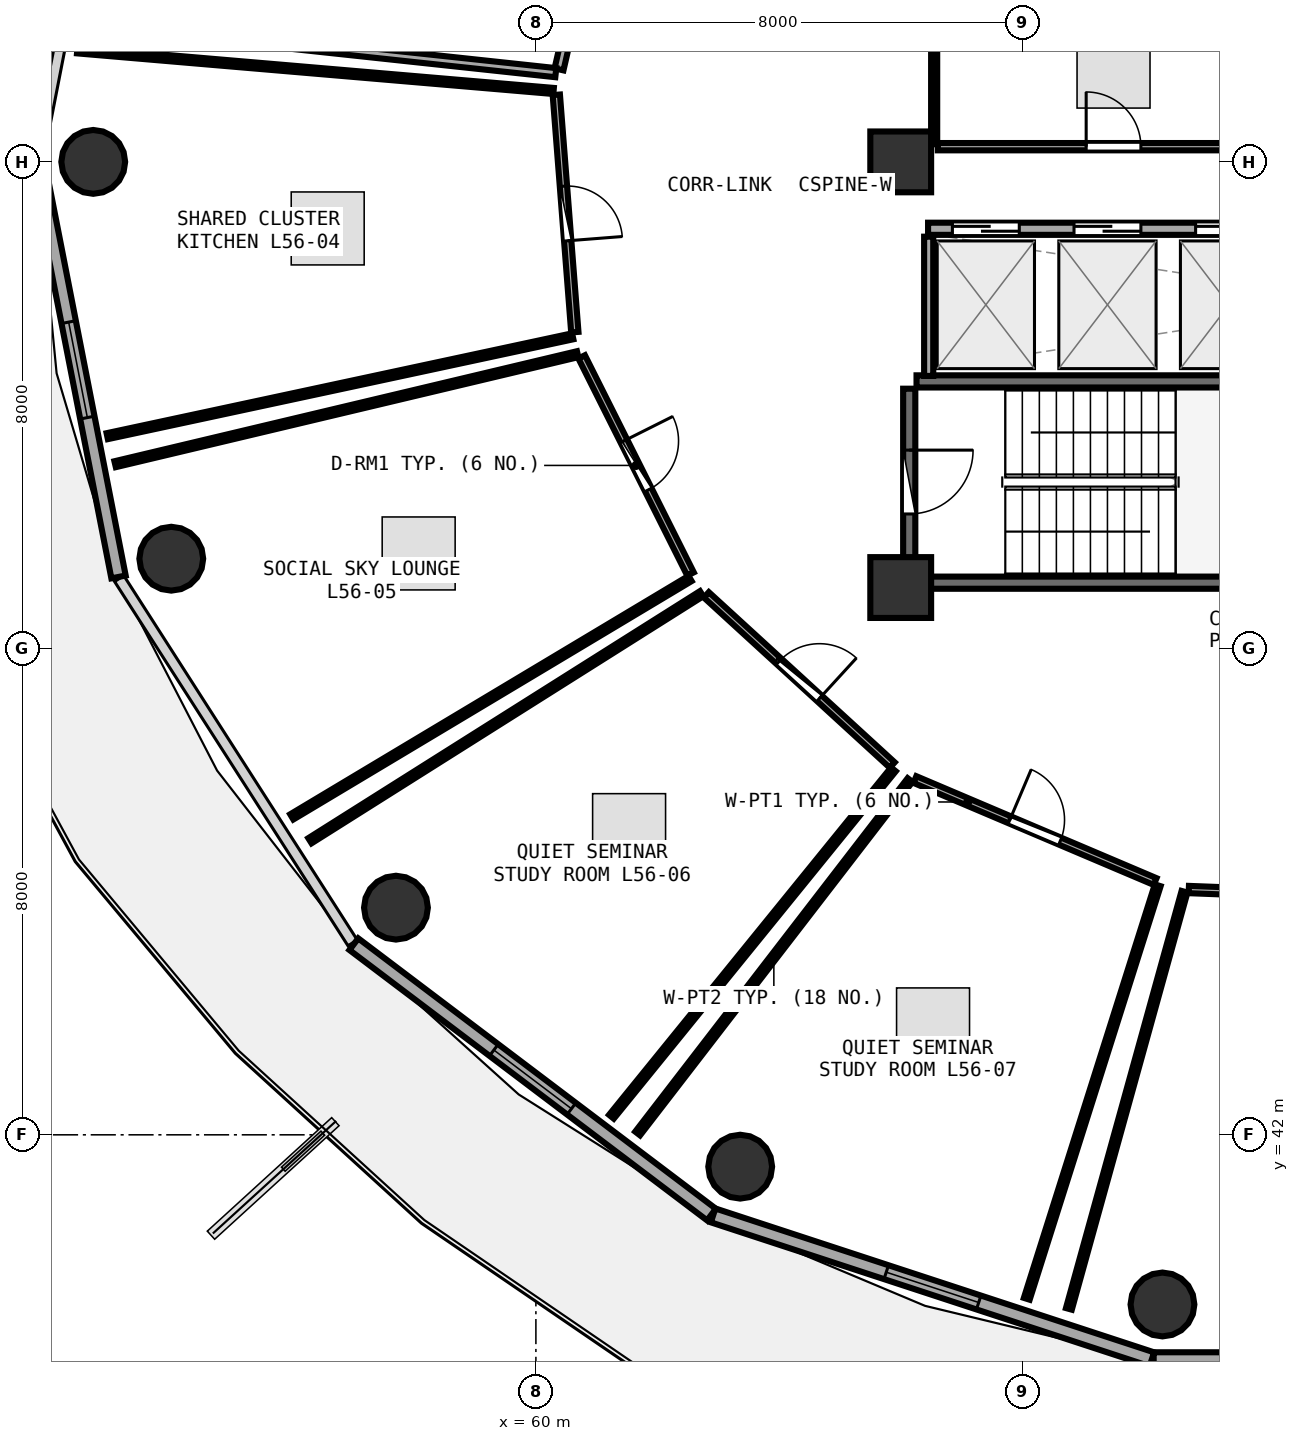
"""IFC4 building model, lengths in metres.
Left out: names, types, materials, properties, quantities, classifications, styles, units other than length and angle.
Written with IfcOpenShell. Run it as: python <this file> out.ifc"""

import sys

from ifc_helpers import new_model, si_unit, direction, frame, frame_2d, origin, origin_2d, place, context, subcontext, project, spatial, rectangle, circle, extrude, element, fill, save


model = new_model("IFC4")
c1 = context("Model", 3, precision=1e-05, world=origin(), true_north=direction((0.0, 1.0)))
c2 = subcontext(c1, "Body", "Model", "MODEL_VIEW")
j1 = project(units=[si_unit("LENGTHUNIT", "METRE"), si_unit("PLANEANGLEUNIT", "RADIAN")], contexts=[c1])
p1 = place(None, origin())
s1 = spatial("IfcSite", under=j1, at=p1, CompositionType="ELEMENT")
p2 = place(p1, origin())
s2 = spatial("IfcBuilding", under=s1, at=p2, CompositionType="ELEMENT")
p3 = place(p2, frame((0.0, 0.0, 219.45)))
s3 = spatial("IfcBuildingStorey", under=s2, at=p3, CompositionType="ELEMENT", Elevation=219.45)
for number, where, z_axis, x_axis in (
    (1, (66.0, 51.0, 0.0), (0.0, 0.0, 1.0), (1.0, 0.0, 0.0)),
    (2, (66.0, 58.0, 0.0), (0.0, 0.0, 1.0), (1.0, 0.0, 0.0)),
):
    element("IfcColumn", number, at=place(p3, frame(where, z_axis=z_axis, x_axis=x_axis)), inside=s3, PredefinedType="PILASTER", context=c2, shape_type="SweptSolid", body=[
        extrude(rectangle(XDim=1.0, YDim=1.0, at=origin_2d()), origin(), (0.0, 0.0, 1.0), 3.75),
    ])
for number, where, z_axis, x_axis in (
    (3, (52.72, 58.0, 0.0), (0.0, 0.0, 1.0), (1.0, 0.0, 0.0)),
    (4, (54.003, 51.474, 0.0), (0.0, 0.0, 1.0), (1.0, 0.0, 0.0)),
    (5, (57.698, 45.736, 0.0), (0.0, 0.0, 1.0), (1.0, 0.0, 0.0)),
    (6, (63.36, 41.476, 0.0), (0.0, 0.0, 1.0), (1.0, 0.0, 0.0)),
    (7, (70.305, 39.21, 0.0), (0.0, 0.0, 1.0), (1.0, 0.0, 0.0)),
):
    element("IfcColumn", number, at=place(p3, frame(where, z_axis=z_axis, x_axis=x_axis)), inside=s3, PredefinedType="COLUMN", context=c2, shape_type="SweptSolid", body=[
        extrude(circle(Radius=0.525, at=origin_2d()), origin(), (0.0, 0.0, 1.0), 3.75),
    ])
p4 = place(p3, frame((51.803, 57.985, 0.0), z_axis=(0.0, 0.0, 1.0), x_axis=(0.192069055673, -0.981381413036, 0.0)))
e8 = element("IfcWall", 8, at=p4, inside=s3, PredefinedType="SOLIDWALL", context=c2, shape_type="SweptSolid", body=[
    extrude(rectangle(XDim=6.94, YDim=0.24, at=frame_2d((3.47, 0.0))), origin(), (0.0, 0.0, 1.0), 3.475),
])
p5 = place(p4, frame((2.67, 0.0, 0.85)))
e9 = element("IfcOpeningElement", 9, at=p5, cuts=e8, PredefinedType="OPENING", context=c2, shape_type="SweptSolid", body=[
    extrude(rectangle(XDim=1.6, YDim=1.45, at=frame_2d((0.8, 0.725))), frame((0.0, 0.13, 0.0), z_axis=(0.0, -1.0, 0.0), x_axis=(1.0, 0.0, 0.0)), (0.0, 0.0, 1.0), 0.26),
])
p6 = place(p3, frame((57.006, 45.135, 0.0), z_axis=(0.0, 0.0, 1.0), x_axis=(0.797701674595, -0.603052268338, 0.0)))
e10 = element("IfcWall", 10, at=p6, inside=s3, PredefinedType="SOLIDWALL", context=c2, shape_type="SweptSolid", body=[
    extrude(rectangle(XDim=7.374, YDim=0.24, at=frame_2d((3.687, 0.0))), origin(), (0.0, 0.0, 1.0), 3.475),
])
p7 = place(p6, frame((2.887, 0.0, 0.85)))
e11 = element("IfcOpeningElement", 11, at=p7, cuts=e10, PredefinedType="OPENING", context=c2, shape_type="SweptSolid", body=[
    extrude(rectangle(XDim=1.6, YDim=1.45, at=frame_2d((0.8, 0.725))), frame((0.0, 0.13, 0.0), z_axis=(0.0, -1.0, 0.0), x_axis=(1.0, 0.0, 0.0)), (0.0, 0.0, 1.0), 0.26),
])
p8 = place(p3, frame((62.914, 40.675, 0.0), z_axis=(0.0, 0.0, 1.0), x_axis=(0.95022142767, -0.31157541366, 0.0)))
e12 = element("IfcWall", 12, at=p8, inside=s3, PredefinedType="SOLIDWALL", context=c2, shape_type="SweptSolid", body=[
    extrude(rectangle(XDim=7.594, YDim=0.24, at=frame_2d((3.797, 0.0))), origin(), (0.0, 0.0, 1.0), 3.475),
])
p9 = place(p8, frame((2.997, 0.0, 0.85)))
e13 = element("IfcOpeningElement", 13, at=p9, cuts=e12, PredefinedType="OPENING", context=c2, shape_type="SweptSolid", body=[
    extrude(rectangle(XDim=1.6, YDim=1.45, at=frame_2d((0.8, 0.725))), frame((0.0, 0.13, 0.0), z_axis=(0.0, -1.0, 0.0), x_axis=(1.0, 0.0, 0.0)), (0.0, 0.0, 1.0), 0.26),
])
p10 = place(p3, frame((70.16, 38.304, 0.0), z_axis=(0.0, 0.0, 1.0), x_axis=(1.0, 0.0, 0.0)))
e14 = element("IfcWall", 14, at=p10, inside=s3, PredefinedType="SOLIDWALL", context=c2, shape_type="SweptSolid", body=[
    extrude(rectangle(XDim=7.68, YDim=0.24, at=frame_2d((3.84, 0.0))), origin(), (0.0, 0.0, 1.0), 3.475),
])
p11 = place(p10, frame((3.04, 0.0, 0.85)))
e15 = element("IfcOpeningElement", 15, at=p11, cuts=e14, PredefinedType="OPENING", context=c2, shape_type="SweptSolid", body=[
    extrude(rectangle(XDim=1.6, YDim=1.45, at=frame_2d((0.8, 0.725))), frame((0.0, 0.13, 0.0), z_axis=(0.0, -1.0, 0.0), x_axis=(1.0, 0.0, 0.0)), (0.0, 0.0, 1.0), 0.26),
])
for number, where, z_axis, x_axis in (
    (16, (66.26, 51.08, 0.0), (0.0, 0.0, 1.0), (1.0, 0.0, 0.0)),
    (17, (73.42, 54.39, 0.0), (0.0, 0.0, 1.0), (-1.0, 0.0, 0.0)),
):
    element("IfcWall", number, at=place(p3, frame(where, z_axis=z_axis, x_axis=x_axis)), inside=s3, PredefinedType="SHEAR", context=c2, shape_type="SweptSolid", body=[
        extrude(rectangle(XDim=7.16, YDim=0.2, at=frame_2d((3.58, 0.0))), origin(), (0.0, 0.0, 1.0), 3.49),
    ])
p12 = place(p3, frame((66.14, 54.27, 0.0), z_axis=(0.0, 0.0, 1.0), x_axis=(0.0, -1.0, 0.0)))
e18 = element("IfcWall", 18, at=p12, inside=s3, PredefinedType="SHEAR", context=c2, shape_type="SweptSolid", body=[
    extrude(rectangle(XDim=3.07, YDim=0.2, at=frame_2d((1.535, 0.0))), origin(), (0.0, 0.0, 1.0), 3.49),
])
p13 = place(p12, frame((1.01, 0.0, 0.0)))
e19 = element("IfcOpeningElement", 19, at=p13, cuts=e18, PredefinedType="OPENING", context=c2, shape_type="SweptSolid", body=[
    extrude(rectangle(XDim=1.05, YDim=2.1, at=frame_2d((0.525, 1.05))), frame((0.0, 0.11, 0.0), z_axis=(0.0, -1.0, 0.0), x_axis=(1.0, 0.0, 0.0)), (0.0, 0.0, 1.0), 0.22),
])
p14 = place(p3, frame((66.45, 56.9, 0.0), z_axis=(0.0, 0.0, 1.0), x_axis=(1.0, 0.0, 0.0)))
e20 = element("IfcWall", 20, at=p14, inside=s3, PredefinedType="SOLIDWALL", context=c2, shape_type="SweptSolid", body=[
    extrude(rectangle(XDim=14.4, YDim=0.2, at=frame_2d((7.2, 0.0))), origin(), (0.0, 0.0, 1.0), 3.48),
])
p15 = place(p14, frame((0.4, 0.0, 0.0)))
e21 = element("IfcOpeningElement", 21, at=p15, cuts=e20, PredefinedType="OPENING", context=c2, shape_type="SweptSolid", body=[
    extrude(rectangle(XDim=1.1, YDim=2.1, at=frame_2d((0.55, 1.05))), frame((0.0, 0.11, 0.0), z_axis=(0.0, -1.0, 0.0), x_axis=(1.0, 0.0, 0.0)), (0.0, 0.0, 1.0), 0.22),
])
p16 = place(p14, frame((2.4, 0.0, 0.0)))
e22 = element("IfcOpeningElement", 22, at=p16, cuts=e20, PredefinedType="OPENING", context=c2, shape_type="SweptSolid", body=[
    extrude(rectangle(XDim=1.1, YDim=2.1, at=frame_2d((0.55, 1.05))), frame((0.0, 0.11, 0.0), z_axis=(0.0, -1.0, 0.0), x_axis=(1.0, 0.0, 0.0)), (0.0, 0.0, 1.0), 0.22),
])
p17 = place(p14, frame((4.4, 0.0, 0.0)))
e23 = element("IfcOpeningElement", 23, at=p17, cuts=e20, PredefinedType="OPENING", context=c2, shape_type="SweptSolid", body=[
    extrude(rectangle(XDim=1.1, YDim=2.1, at=frame_2d((0.55, 1.05))), frame((0.0, 0.11, 0.0), z_axis=(0.0, -1.0, 0.0), x_axis=(1.0, 0.0, 0.0)), (0.0, 0.0, 1.0), 0.22),
])
p18 = place(p3, frame((66.46, 54.48, 0.0), z_axis=(0.0, 0.0, 1.0), x_axis=(0.0, 1.0, 0.0)))
e24 = element("IfcWall", 24, at=p18, inside=s3, PredefinedType="PARTITIONING", context=c2, shape_type="SweptSolid", body=[
    extrude(rectangle(XDim=2.29, YDim=0.15, at=frame_2d((1.145, 0.0))), origin(), (0.0, 0.0, 1.0), 3.48),
])
p19 = place(p3, frame((66.61, 58.25, 0.0), z_axis=(0.0, 0.0, 1.0), x_axis=(1.0, 0.0, 0.0)))
e25 = element("IfcWall", 25, at=p19, inside=s3, PredefinedType="PARTITIONING", context=c2, shape_type="SweptSolid", body=[
    extrude(rectangle(XDim=5.78, YDim=0.12, at=frame_2d((2.89, 0.0))), origin(), (0.0, 0.0, 1.0), 3.48),
])
p20 = place(p19, frame((2.44, 0.0, 0.0)))
e26 = element("IfcOpeningElement", 26, at=p20, cuts=e25, PredefinedType="OPENING", context=c2, shape_type="SweptSolid", body=[
    extrude(rectangle(XDim=0.9, YDim=2.08, at=frame_2d((0.45, 1.04))), frame((0.0, 0.07, 0.0), z_axis=(0.0, -1.0, 0.0), x_axis=(1.0, 0.0, 0.0)), (0.0, 0.0, 1.0), 0.14),
])
p21 = place(p3, frame((70.738, 46.034, 0.0), z_axis=(0.0, 0.0, 1.0), x_axis=(0.99928078405, -0.037919844777, 0.0)))
e27 = element("IfcWall", 27, at=p21, inside=s3, PredefinedType="PARTITIONING", context=c2, shape_type="SweptSolid", body=[
    extrude(rectangle(XDim=5.389, YDim=0.12, at=frame_2d((2.694, 0.0))), origin(), (0.0, 0.0, 1.0), 3.025),
])
p22 = place(p21, frame((2.244, 0.0, 0.0)))
e28 = element("IfcOpeningElement", 28, at=p22, cuts=e27, PredefinedType="OPENING", context=c2, shape_type="SweptSolid", body=[
    extrude(rectangle(XDim=0.9, YDim=2.08, at=frame_2d((0.45, 1.04))), frame((0.0, 0.07, 0.0), z_axis=(0.0, -1.0, 0.0), x_axis=(1.0, 0.0, 0.0)), (0.0, 0.0, 1.0), 0.14),
])
p23 = place(p3, frame((60.823, 61.446, 0.0), z_axis=(0.0, 0.0, 1.0), x_axis=(-0.223956243079, -0.97459920028, 0.0)))
e29 = element("IfcWall", 29, at=p23, inside=s3, PredefinedType="PARTITIONING", context=c2, shape_type="SweptSolid", body=[
    extrude(rectangle(XDim=1.974, YDim=0.15, at=frame_2d((0.987, 0.0))), origin(), (0.0, 0.0, 1.0), 3.48),
])
p24 = place(p23, frame((0.512, 0.0, 0.0)))
e30 = element("IfcOpeningElement", 30, at=p24, cuts=e29, PredefinedType="OPENING", context=c2, shape_type="SweptSolid", body=[
    extrude(rectangle(XDim=0.95, YDim=2.08, at=frame_2d((0.475, 1.04))), frame((0.0, 0.085, 0.0), z_axis=(0.0, -1.0, 0.0), x_axis=(1.0, 0.0, 0.0)), (0.0, 0.0, 1.0), 0.17),
])
p25 = place(p3, frame((60.336, 59.103, 0.0), z_axis=(0.0, 0.0, 1.0), x_axis=(0.07781697677, -0.996967661525, 0.0)))
e31 = element("IfcWall", 31, at=p25, inside=s3, PredefinedType="PARTITIONING", context=c2, shape_type="SweptSolid", body=[
    extrude(rectangle(XDim=3.916, YDim=0.12, at=frame_2d((1.958, 0.0))), origin(), (0.0, 0.0, 1.0), 3.025),
])
p26 = place(p25, frame((1.508, 0.0, 0.0)))
e32 = element("IfcOpeningElement", 32, at=p26, cuts=e31, PredefinedType="OPENING", context=c2, shape_type="SweptSolid", body=[
    extrude(rectangle(XDim=0.9, YDim=2.08, at=frame_2d((0.45, 1.04))), frame((0.0, 0.07, 0.0), z_axis=(0.0, -1.0, 0.0), x_axis=(1.0, 0.0, 0.0)), (0.0, 0.0, 1.0), 0.14),
])
p27 = place(p3, frame((60.753, 54.793, 0.0), z_axis=(0.0, 0.0, 1.0), x_axis=(0.448191244457, -0.893937698272, 0.0)))
e33 = element("IfcWall", 33, at=p27, inside=s3, PredefinedType="PARTITIONING", context=c2, shape_type="SweptSolid", body=[
    extrude(rectangle(XDim=3.994, YDim=0.12, at=frame_2d((1.997, 0.0))), origin(), (0.0, 0.0, 1.0), 3.025),
])
p28 = place(p27, frame((1.547, 0.0, 0.0)))
e34 = element("IfcOpeningElement", 34, at=p28, cuts=e33, PredefinedType="OPENING", context=c2, shape_type="SweptSolid", body=[
    extrude(rectangle(XDim=0.9, YDim=2.08, at=frame_2d((0.45, 1.04))), frame((0.0, 0.07, 0.0), z_axis=(0.0, -1.0, 0.0), x_axis=(1.0, 0.0, 0.0)), (0.0, 0.0, 1.0), 0.14),
])
p29 = place(p3, frame((62.803, 50.879, 0.0), z_axis=(0.0, 0.0, 1.0), x_axis=(0.737723633035, -0.675102837545, 0.0)))
e35 = element("IfcWall", 35, at=p29, inside=s3, PredefinedType="PARTITIONING", context=c2, shape_type="SweptSolid", body=[
    extrude(rectangle(XDim=4.144, YDim=0.12, at=frame_2d((2.072, 0.0))), origin(), (0.0, 0.0, 1.0), 3.025),
])
p30 = place(p29, frame((1.622, 0.0, 0.0)))
e36 = element("IfcOpeningElement", 36, at=p30, cuts=e35, PredefinedType="OPENING", context=c2, shape_type="SweptSolid", body=[
    extrude(rectangle(XDim=0.9, YDim=2.08, at=frame_2d((0.45, 1.04))), frame((0.0, 0.07, 0.0), z_axis=(0.0, -1.0, 0.0), x_axis=(1.0, 0.0, 0.0)), (0.0, 0.0, 1.0), 0.14),
])
p31 = place(p3, frame((66.233, 47.843, 0.0), z_axis=(0.0, 0.0, 1.0), x_axis=(0.920481353999, -0.390786485105, 0.0)))
e37 = element("IfcWall", 37, at=p31, inside=s3, PredefinedType="PARTITIONING", context=c2, shape_type="SweptSolid", body=[
    extrude(rectangle(XDim=4.292, YDim=0.12, at=frame_2d((2.146, 0.0))), origin(), (0.0, 0.0, 1.0), 3.235),
])
p32 = place(p31, frame((1.696, 0.0, 0.0)))
e38 = element("IfcOpeningElement", 38, at=p32, cuts=e37, PredefinedType="OPENING", context=c2, shape_type="SweptSolid", body=[
    extrude(rectangle(XDim=0.9, YDim=2.08, at=frame_2d((0.45, 1.04))), frame((0.0, 0.07, 0.0), z_axis=(0.0, -1.0, 0.0), x_axis=(1.0, 0.0, 0.0)), (0.0, 0.0, 1.0), 0.14),
])
p33 = place(p3, frame((66.55, 60.68, 0.0), z_axis=(0.0, 0.0, 1.0), x_axis=(0.0, -1.0, 0.0)))
e39 = element("IfcWall", 39, at=p33, inside=s3, PredefinedType="PARTITIONING", context=c2, shape_type="SweptSolid", body=[
    extrude(rectangle(XDim=2.39, YDim=0.1, at=frame_2d((1.195, 0.0))), origin(), (0.0, 0.0, 1.0), 3.48),
])
p34 = place(p3, frame((68.766, 39.137, 0.0), z_axis=(0.0, 0.0, 1.0), x_axis=(0.267125564166, 0.96366173161, 0.0)))
e40 = element("IfcWall", 40, at=p34, inside=s3, PredefinedType="PARTITIONING", context=c2, shape_type="SweptSolid", body=[
    extrude(rectangle(XDim=7.119, YDim=0.1, at=frame_2d((3.56, 0.0))), origin(), (0.0, 0.0, 1.0), 3.075),
])
p35 = place(p3, frame((60.327, 59.467, 0.0), z_axis=(0.0, 0.0, 1.0), x_axis=(-0.994280915129, 0.10679635673, 0.0)))
e41 = element("IfcWall", 41, at=p35, inside=s3, PredefinedType="PARTITIONING", context=c2, shape_type="SweptSolid", body=[
    extrude(rectangle(XDim=7.859, YDim=0.15, at=frame_2d((3.93, 0.0))), origin(), (0.0, 0.0, 1.0), 3.075),
])
p36 = place(p3, frame((60.606, 55.132, 0.0), z_axis=(0.0, 0.0, 1.0), x_axis=(-0.977761328162, -0.209720731335, 0.0)))
e42 = element("IfcWall", 42, at=p36, inside=s3, PredefinedType="PARTITIONING", context=c2, shape_type="SweptSolid", body=[
    extrude(rectangle(XDim=7.83, YDim=0.1, at=frame_2d((3.915, 0.0))), origin(), (0.0, 0.0, 1.0), 3.075),
])
p37 = place(p3, frame((52.457, 59.835, 0.0), z_axis=(0.0, 0.0, 1.0), x_axis=(0.996382192496, -0.084985448623, 0.0)))
e43 = element("IfcWall", 43, at=p37, inside=s3, PredefinedType="PARTITIONING", context=c2, shape_type="SweptSolid", body=[
    extrude(rectangle(XDim=7.863, YDim=0.1, at=frame_2d((3.931, 0.0))), origin(), (0.0, 0.0, 1.0), 3.075),
])
p38 = place(p3, frame((62.536, 51.148, 0.0), z_axis=(0.0, 0.0, 1.0), x_axis=(-0.858084969996, -0.513507725615, 0.0)))
e44 = element("IfcWall", 44, at=p38, inside=s3, PredefinedType="PARTITIONING", context=c2, shape_type="SweptSolid", body=[
    extrude(rectangle(XDim=7.634, YDim=0.1, at=frame_2d((3.817, 0.0))), origin(), (0.0, 0.0, 1.0), 3.025),
])
p39 = place(p3, frame((53.08, 53.028, 0.0), z_axis=(0.0, 0.0, 1.0), x_axis=(0.972861128156, 0.231389769272, 0.0)))
e45 = element("IfcWall", 45, at=p39, inside=s3, PredefinedType="PARTITIONING", context=c2, shape_type="SweptSolid", body=[
    extrude(rectangle(XDim=7.819, YDim=0.1, at=frame_2d((3.91, 0.0))), origin(), (0.0, 0.0, 1.0), 3.075),
])
p40 = place(p3, frame((65.88, 48.01, 0.0), z_axis=(0.0, 0.0, 1.0), x_axis=(-0.630262810813, -0.776381857919, 0.0)))
e46 = element("IfcWall", 46, at=p40, inside=s3, PredefinedType="PARTITIONING", context=c2, shape_type="SweptSolid", body=[
    extrude(rectangle(XDim=7.358, YDim=0.1, at=frame_2d((3.679, 0.0))), origin(), (0.0, 0.0, 1.0), 3.025),
])
p41 = place(p3, frame((56.284, 46.836, 0.0), z_axis=(0.0, 0.0, 1.0), x_axis=(0.84583000996, 0.533452522959, 0.0)))
e47 = element("IfcWall", 47, at=p41, inside=s3, PredefinedType="PARTITIONING", context=c2, shape_type="SweptSolid", body=[
    extrude(rectangle(XDim=7.615, YDim=0.1, at=frame_2d((3.808, 0.0))), origin(), (0.0, 0.0, 1.0), 3.075),
])
p42 = place(p3, frame((70.227, 46.104, 0.0), z_axis=(0.0, 0.0, 1.0), x_axis=(-0.30191088513, -0.953336151334, 0.0)))
e48 = element("IfcWall", 48, at=p42, inside=s3, PredefinedType="PARTITIONING", context=c2, shape_type="SweptSolid", body=[
    extrude(rectangle(XDim=7.134, YDim=0.1, at=frame_2d((3.567, 0.0))), origin(), (0.0, 0.0, 1.0), 3.075),
])
p43 = place(p3, frame((61.673, 42.022, 0.0), z_axis=(0.0, 0.0, 1.0), x_axis=(0.610486992252, 0.792026282576, 0.0)))
e49 = element("IfcWall", 49, at=p43, inside=s3, PredefinedType="PARTITIONING", context=c2, shape_type="SweptSolid", body=[
    extrude(rectangle(XDim=7.339, YDim=0.1, at=frame_2d((3.669, 0.0))), origin(), (0.0, 0.0, 1.0), 3.025),
])
p44 = place(p5, origin())
e50 = element("IfcWindow", 50, at=p44, inside=s3, PartitioningType="SINGLE_PANEL", PredefinedType="WINDOW", context=c2, shape_type="SweptSolid", body=[
    extrude(rectangle(XDim=1.6, YDim=1.45, at=frame_2d((0.8, 0.725))), frame((0.0, 0.03, 0.0), z_axis=(0.0, -1.0, 0.0), x_axis=(1.0, 0.0, 0.0)), (0.0, 0.0, 1.0), 0.06),
])
fill(e9, e50)
p45 = place(p7, origin())
e51 = element("IfcWindow", 51, at=p45, inside=s3, PartitioningType="SINGLE_PANEL", PredefinedType="WINDOW", context=c2, shape_type="SweptSolid", body=[
    extrude(rectangle(XDim=1.6, YDim=1.45, at=frame_2d((0.8, 0.725))), frame((0.0, 0.03, 0.0), z_axis=(0.0, -1.0, 0.0), x_axis=(1.0, 0.0, 0.0)), (0.0, 0.0, 1.0), 0.06),
])
fill(e11, e51)
p46 = place(p9, origin())
e52 = element("IfcWindow", 52, at=p46, inside=s3, PartitioningType="SINGLE_PANEL", PredefinedType="WINDOW", context=c2, shape_type="SweptSolid", body=[
    extrude(rectangle(XDim=1.6, YDim=1.45, at=frame_2d((0.8, 0.725))), frame((0.0, 0.03, 0.0), z_axis=(0.0, -1.0, 0.0), x_axis=(1.0, 0.0, 0.0)), (0.0, 0.0, 1.0), 0.06),
])
fill(e13, e52)
p47 = place(p13, origin())
e53 = element("IfcDoor", 53, at=p47, inside=s3, OperationType="SINGLE_SWING_LEFT", PredefinedType="DOOR", context=c2, shape_type="SweptSolid", body=[
    extrude(rectangle(XDim=1.05, YDim=2.1, at=frame_2d((0.525, 1.05))), frame((0.0, 0.025, 0.0), z_axis=(0.0, -1.0, 0.0), x_axis=(1.0, 0.0, 0.0)), (0.0, 0.0, 1.0), 0.05),
])
fill(e19, e53)
p48 = place(p15, origin())
e54 = element("IfcDoor", 54, at=p48, inside=s3, OperationType="DOUBLE_DOOR_SLIDING", PredefinedType="DOOR", context=c2, shape_type="SweptSolid", body=[
    extrude(rectangle(XDim=1.1, YDim=2.1, at=frame_2d((0.55, 1.05))), frame((0.0, 0.025, 0.0), z_axis=(0.0, -1.0, 0.0), x_axis=(1.0, 0.0, 0.0)), (0.0, 0.0, 1.0), 0.05),
])
fill(e21, e54)
p49 = place(p16, origin())
e55 = element("IfcDoor", 55, at=p49, inside=s3, OperationType="DOUBLE_DOOR_SLIDING", PredefinedType="DOOR", context=c2, shape_type="SweptSolid", body=[
    extrude(rectangle(XDim=1.1, YDim=2.1, at=frame_2d((0.55, 1.05))), frame((0.0, 0.025, 0.0), z_axis=(0.0, -1.0, 0.0), x_axis=(1.0, 0.0, 0.0)), (0.0, 0.0, 1.0), 0.05),
])
fill(e22, e55)
p50 = place(p17, origin())
e56 = element("IfcDoor", 56, at=p50, inside=s3, OperationType="DOUBLE_DOOR_SLIDING", PredefinedType="DOOR", context=c2, shape_type="SweptSolid", body=[
    extrude(rectangle(XDim=1.1, YDim=2.1, at=frame_2d((0.55, 1.05))), frame((0.0, 0.025, 0.0), z_axis=(0.0, -1.0, 0.0), x_axis=(1.0, 0.0, 0.0)), (0.0, 0.0, 1.0), 0.05),
])
fill(e23, e56)
p51 = place(p20, origin())
e57 = element("IfcDoor", 57, at=p51, inside=s3, OperationType="SINGLE_SWING_LEFT", PredefinedType="DOOR", context=c2, shape_type="SweptSolid", body=[
    extrude(rectangle(XDim=0.9, YDim=2.08, at=frame_2d((0.45, 1.04))), frame((0.0, 0.025, 0.0), z_axis=(0.0, -1.0, 0.0), x_axis=(1.0, 0.0, 0.0)), (0.0, 0.0, 1.0), 0.05),
])
fill(e26, e57)
p52 = place(p26, origin())
e58 = element("IfcDoor", 58, at=p52, inside=s3, OperationType="SINGLE_SWING_RIGHT", PredefinedType="DOOR", context=c2, shape_type="SweptSolid", body=[
    extrude(rectangle(XDim=0.9, YDim=2.08, at=frame_2d((0.45, 1.04))), frame((0.0, 0.025, 0.0), z_axis=(0.0, -1.0, 0.0), x_axis=(1.0, 0.0, 0.0)), (0.0, 0.0, 1.0), 0.05),
])
fill(e32, e58)
p53 = place(p28, origin())
e59 = element("IfcDoor", 59, at=p53, inside=s3, OperationType="SINGLE_SWING_LEFT", PredefinedType="DOOR", context=c2, shape_type="SweptSolid", body=[
    extrude(rectangle(XDim=0.9, YDim=2.08, at=frame_2d((0.45, 1.04))), frame((0.0, 0.025, 0.0), z_axis=(0.0, -1.0, 0.0), x_axis=(1.0, 0.0, 0.0)), (0.0, 0.0, 1.0), 0.05),
])
fill(e34, e59)
p54 = place(p30, origin())
e60 = element("IfcDoor", 60, at=p54, inside=s3, OperationType="SINGLE_SWING_RIGHT", PredefinedType="DOOR", context=c2, shape_type="SweptSolid", body=[
    extrude(rectangle(XDim=0.9, YDim=2.08, at=frame_2d((0.45, 1.04))), frame((0.0, 0.025, 0.0), z_axis=(0.0, -1.0, 0.0), x_axis=(1.0, 0.0, 0.0)), (0.0, 0.0, 1.0), 0.05),
])
fill(e36, e60)
p55 = place(p32, origin())
e61 = element("IfcDoor", 61, at=p55, inside=s3, OperationType="SINGLE_SWING_LEFT", PredefinedType="DOOR", context=c2, shape_type="SweptSolid", body=[
    extrude(rectangle(XDim=0.9, YDim=2.08, at=frame_2d((0.45, 1.04))), frame((0.0, 0.025, 0.0), z_axis=(0.0, -1.0, 0.0), x_axis=(1.0, 0.0, 0.0)), (0.0, 0.0, 1.0), 0.05),
])
fill(e38, e61)
save(model, sys.argv[1])
